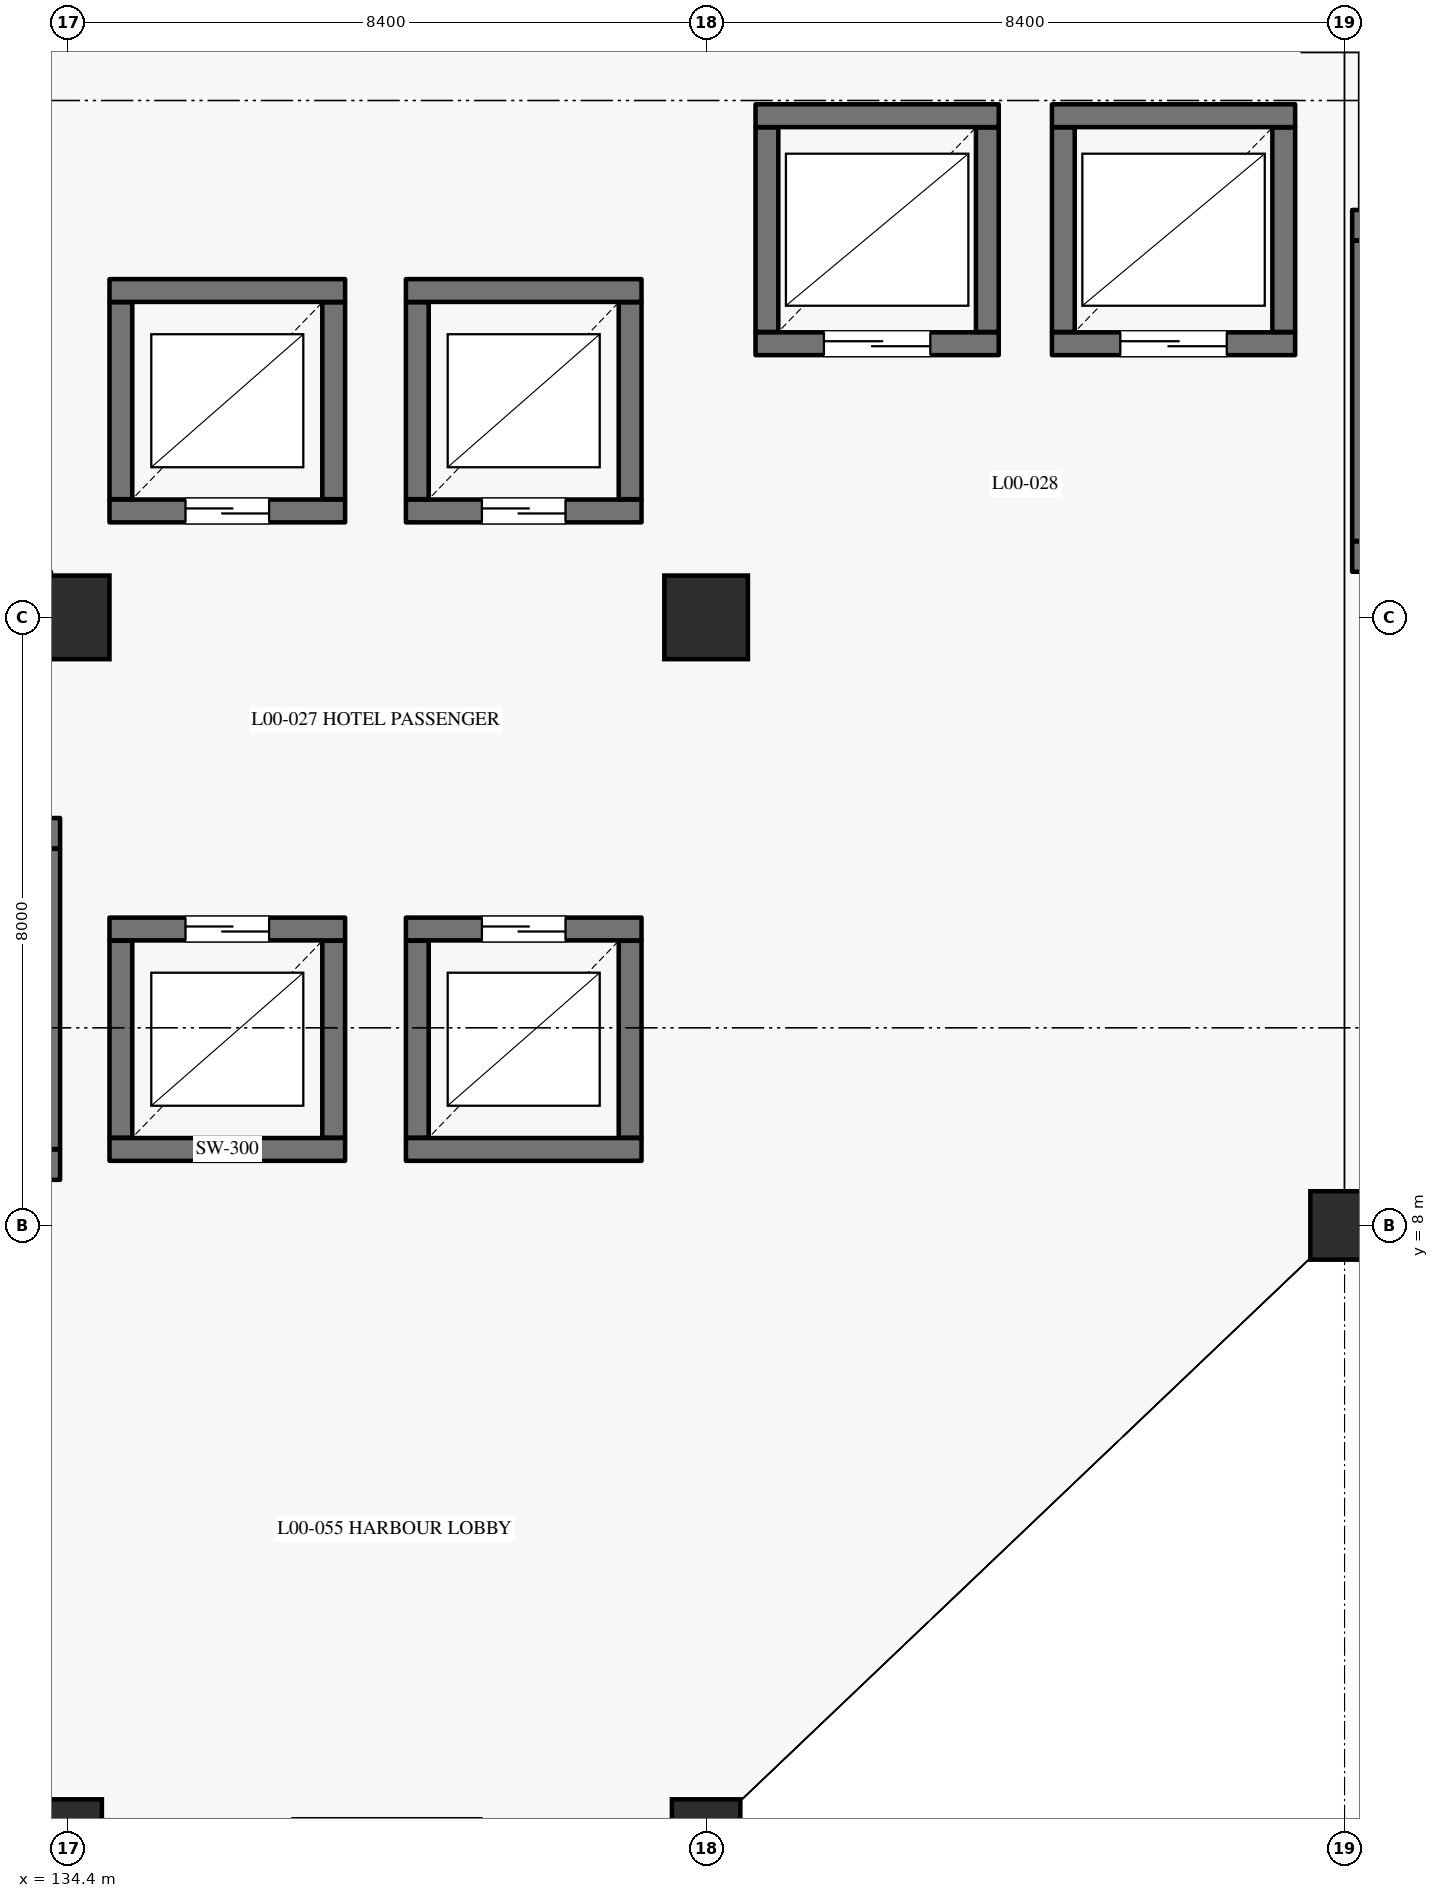
"""IFC4 building model, lengths in metres.
Left out: names, types, materials, properties, quantities, classifications, styles, units other than length and angle.
Written with IfcOpenShell. Run it as: python <this file> out.ifc"""

import sys

from ifc_helpers import new_model, si_unit, direction, frame, frame_2d, origin, origin_2d, place, context, subcontext, project, spatial, rectangle, circle, extrude, element, fill, save


model = new_model("IFC4")
c1 = context("Model", 3, precision=1e-05, world=origin(), true_north=direction((0.0, 1.0)))
c2 = subcontext(c1, "Body", "Model", "MODEL_VIEW")
j1 = project(units=[si_unit("LENGTHUNIT", "METRE"), si_unit("PLANEANGLEUNIT", "RADIAN")], contexts=[c1])
p1 = place(None, origin())
s1 = spatial("IfcSite", under=j1, at=p1, CompositionType="ELEMENT")
p2 = place(p1, origin())
s2 = spatial("IfcBuilding", under=s1, at=p2, CompositionType="ELEMENT")
p3 = place(p2, origin())
s3 = spatial("IfcBuildingStorey", under=s2, at=p3, CompositionType="ELEMENT", Elevation=0.0)
p4 = place(p3, frame((134.4, 0.0, 0.0), z_axis=(0.0, 0.0, 1.0), x_axis=(1.0, 0.0, 0.0)))
e1 = element("IfcColumn", 1, at=p4, inside=s3, PredefinedType="COLUMN", context=c2, shape_type="SweptSolid", body=[
    extrude(circle(Radius=0.45, at=origin_2d()), origin(), (0.0, 0.0, 1.0), 6.0),
])
p5 = place(p3, frame((134.4, 16.0, 0.0), z_axis=(0.0, 0.0, 1.0), x_axis=(1.0, 0.0, 0.0)))
e2 = element("IfcColumn", 2, at=p5, inside=s3, PredefinedType="COLUMN", context=c2, shape_type="SweptSolid", body=[
    extrude(circle(Radius=0.55, at=origin_2d()), origin(), (0.0, 0.0, 1.0), 6.0),
])
p6 = place(p3, frame((142.8, 0.0, 0.0), z_axis=(0.0, 0.0, 1.0), x_axis=(1.0, 0.0, 0.0)))
e3 = element("IfcColumn", 3, at=p6, inside=s3, PredefinedType="COLUMN", context=c2, shape_type="SweptSolid", body=[
    extrude(circle(Radius=0.45, at=origin_2d()), origin(), (0.0, 0.0, 1.0), 6.0),
])
p7 = place(p3, frame((142.8, 16.0, 0.0), z_axis=(0.0, 0.0, 1.0), x_axis=(1.0, 0.0, 0.0)))
e4 = element("IfcColumn", 4, at=p7, inside=s3, PredefinedType="COLUMN", context=c2, shape_type="SweptSolid", body=[
    extrude(circle(Radius=0.55, at=origin_2d()), origin(), (0.0, 0.0, 1.0), 6.0),
])
p8 = place(p3, frame((151.2, 8.0, 0.0), z_axis=(0.0, 0.0, 1.0), x_axis=(1.0, 0.0, 0.0)))
e5 = element("IfcColumn", 5, at=p8, inside=s3, PredefinedType="COLUMN", context=c2, shape_type="SweptSolid", body=[
    extrude(circle(Radius=0.45, at=origin_2d()), origin(), (0.0, 0.0, 1.0), 6.0),
])
p9 = place(p3, frame((134.95, 17.4, 0.0), z_axis=(0.0, 0.0, 1.0), x_axis=(1.0, 0.0, 0.0)))
e6 = element("IfcWall", 6, at=p9, inside=s3, PredefinedType="SHEAR", context=c2, shape_type="SweptSolid", body=[
    extrude(rectangle(XDim=3.1, YDim=0.3, at=frame_2d((1.55, 0.0))), origin(), (0.0, 0.0, 1.0), 5.675),
])
p10 = place(p9, frame((1.0, 0.0, 0.0)))
e7 = element("IfcOpeningElement", 7, at=p10, cuts=e6, PredefinedType="OPENING", context=c2, shape_type="SweptSolid", body=[
    extrude(rectangle(XDim=1.1, YDim=2.2, at=frame_2d((0.55, 1.1))), frame((0.0, 0.16, 0.0), z_axis=(0.0, -1.0, 0.0), x_axis=(1.0, 0.0, 0.0)), (0.0, 0.0, 1.0), 0.32),
])
p11 = place(p3, frame((137.9, 17.555, 0.0), z_axis=(0.0, 0.0, 1.0), x_axis=(0.0, 1.0, 0.0)))
e8 = element("IfcWall", 8, at=p11, inside=s3, PredefinedType="SHEAR", context=c2, shape_type="SweptSolid", body=[
    extrude(rectangle(XDim=2.59, YDim=0.3, at=frame_2d((1.295, 0.0))), origin(), (0.0, 0.0, 1.0), 5.675),
])
p12 = place(p3, frame((138.05, 20.3, 0.0), z_axis=(0.0, 0.0, 1.0), x_axis=(-1.0, 0.0, 0.0)))
e9 = element("IfcWall", 9, at=p12, inside=s3, PredefinedType="SHEAR", context=c2, shape_type="SweptSolid", body=[
    extrude(rectangle(XDim=3.1, YDim=0.3, at=frame_2d((1.55, 0.0))), origin(), (0.0, 0.0, 1.0), 5.675),
])
p13 = place(p3, frame((135.1, 20.145, 0.0), z_axis=(0.0, 0.0, 1.0), x_axis=(0.0, -1.0, 0.0)))
e10 = element("IfcWall", 10, at=p13, inside=s3, PredefinedType="SHEAR", context=c2, shape_type="SweptSolid", body=[
    extrude(rectangle(XDim=2.59, YDim=0.3, at=frame_2d((1.295, 0.0))), origin(), (0.0, 0.0, 1.0), 5.675),
])
p14 = place(p3, frame((138.85, 17.4, 0.0), z_axis=(0.0, 0.0, 1.0), x_axis=(1.0, 0.0, 0.0)))
e11 = element("IfcWall", 11, at=p14, inside=s3, PredefinedType="SHEAR", context=c2, shape_type="SweptSolid", body=[
    extrude(rectangle(XDim=3.1, YDim=0.3, at=frame_2d((1.55, 0.0))), origin(), (0.0, 0.0, 1.0), 5.675),
])
p15 = place(p14, frame((1.0, 0.0, 0.0)))
e12 = element("IfcOpeningElement", 12, at=p15, cuts=e11, PredefinedType="OPENING", context=c2, shape_type="SweptSolid", body=[
    extrude(rectangle(XDim=1.1, YDim=2.2, at=frame_2d((0.55, 1.1))), frame((0.0, 0.16, 0.0), z_axis=(0.0, -1.0, 0.0), x_axis=(1.0, 0.0, 0.0)), (0.0, 0.0, 1.0), 0.32),
])
p16 = place(p3, frame((141.8, 17.555, 0.0), z_axis=(0.0, 0.0, 1.0), x_axis=(0.0, 1.0, 0.0)))
e13 = element("IfcWall", 13, at=p16, inside=s3, PredefinedType="SHEAR", context=c2, shape_type="SweptSolid", body=[
    extrude(rectangle(XDim=2.59, YDim=0.3, at=frame_2d((1.295, 0.0))), origin(), (0.0, 0.0, 1.0), 5.675),
])
p17 = place(p3, frame((141.95, 20.3, 0.0), z_axis=(0.0, 0.0, 1.0), x_axis=(-1.0, 0.0, 0.0)))
e14 = element("IfcWall", 14, at=p17, inside=s3, PredefinedType="SHEAR", context=c2, shape_type="SweptSolid", body=[
    extrude(rectangle(XDim=3.1, YDim=0.3, at=frame_2d((1.55, 0.0))), origin(), (0.0, 0.0, 1.0), 5.675),
])
p18 = place(p3, frame((139.0, 20.145, 0.0), z_axis=(0.0, 0.0, 1.0), x_axis=(0.0, -1.0, 0.0)))
e15 = element("IfcWall", 15, at=p18, inside=s3, PredefinedType="SHEAR", context=c2, shape_type="SweptSolid", body=[
    extrude(rectangle(XDim=2.59, YDim=0.3, at=frame_2d((1.295, 0.0))), origin(), (0.0, 0.0, 1.0), 5.675),
])
p19 = place(p3, frame((134.95, 9.0, 0.0), z_axis=(0.0, 0.0, 1.0), x_axis=(1.0, 0.0, 0.0)))
e16 = element("IfcWall", 16, at=p19, inside=s3, PredefinedType="SHEAR", context=c2, shape_type="SweptSolid", body=[
    extrude(rectangle(XDim=3.1, YDim=0.3, at=frame_2d((1.55, 0.0))), origin(), (0.0, 0.0, 1.0), 5.675),
])
p20 = place(p3, frame((137.9, 9.155, 0.0), z_axis=(0.0, 0.0, 1.0), x_axis=(0.0, 1.0, 0.0)))
e17 = element("IfcWall", 17, at=p20, inside=s3, PredefinedType="SHEAR", context=c2, shape_type="SweptSolid", body=[
    extrude(rectangle(XDim=2.59, YDim=0.3, at=frame_2d((1.295, 0.0))), origin(), (0.0, 0.0, 1.0), 5.675),
])
p21 = place(p3, frame((138.05, 11.9, 0.0), z_axis=(0.0, 0.0, 1.0), x_axis=(-1.0, 0.0, 0.0)))
e18 = element("IfcWall", 18, at=p21, inside=s3, PredefinedType="SHEAR", context=c2, shape_type="SweptSolid", body=[
    extrude(rectangle(XDim=3.1, YDim=0.3, at=frame_2d((1.55, 0.0))), origin(), (0.0, 0.0, 1.0), 5.675),
])
p22 = place(p21, frame((1.0, 0.0, 0.0)))
e19 = element("IfcOpeningElement", 19, at=p22, cuts=e18, PredefinedType="OPENING", context=c2, shape_type="SweptSolid", body=[
    extrude(rectangle(XDim=1.1, YDim=2.2, at=frame_2d((0.55, 1.1))), frame((0.0, 0.16, 0.0), z_axis=(0.0, -1.0, 0.0), x_axis=(1.0, 0.0, 0.0)), (0.0, 0.0, 1.0), 0.32),
])
p23 = place(p3, frame((135.1, 11.745, 0.0), z_axis=(0.0, 0.0, 1.0), x_axis=(0.0, -1.0, 0.0)))
e20 = element("IfcWall", 20, at=p23, inside=s3, PredefinedType="SHEAR", context=c2, shape_type="SweptSolid", body=[
    extrude(rectangle(XDim=2.59, YDim=0.3, at=frame_2d((1.295, 0.0))), origin(), (0.0, 0.0, 1.0), 5.675),
])
p24 = place(p3, frame((138.85, 9.0, 0.0), z_axis=(0.0, 0.0, 1.0), x_axis=(1.0, 0.0, 0.0)))
e21 = element("IfcWall", 21, at=p24, inside=s3, PredefinedType="SHEAR", context=c2, shape_type="SweptSolid", body=[
    extrude(rectangle(XDim=3.1, YDim=0.3, at=frame_2d((1.55, 0.0))), origin(), (0.0, 0.0, 1.0), 5.675),
])
p25 = place(p3, frame((141.8, 9.155, 0.0), z_axis=(0.0, 0.0, 1.0), x_axis=(0.0, 1.0, 0.0)))
e22 = element("IfcWall", 22, at=p25, inside=s3, PredefinedType="SHEAR", context=c2, shape_type="SweptSolid", body=[
    extrude(rectangle(XDim=2.59, YDim=0.3, at=frame_2d((1.295, 0.0))), origin(), (0.0, 0.0, 1.0), 5.675),
])
p26 = place(p3, frame((141.95, 11.9, 0.0), z_axis=(0.0, 0.0, 1.0), x_axis=(-1.0, 0.0, 0.0)))
e23 = element("IfcWall", 23, at=p26, inside=s3, PredefinedType="SHEAR", context=c2, shape_type="SweptSolid", body=[
    extrude(rectangle(XDim=3.1, YDim=0.3, at=frame_2d((1.55, 0.0))), origin(), (0.0, 0.0, 1.0), 5.675),
])
p27 = place(p26, frame((1.0, 0.0, 0.0)))
e24 = element("IfcOpeningElement", 24, at=p27, cuts=e23, PredefinedType="OPENING", context=c2, shape_type="SweptSolid", body=[
    extrude(rectangle(XDim=1.1, YDim=2.2, at=frame_2d((0.55, 1.1))), frame((0.0, 0.16, 0.0), z_axis=(0.0, -1.0, 0.0), x_axis=(1.0, 0.0, 0.0)), (0.0, 0.0, 1.0), 0.32),
])
p28 = place(p3, frame((139.0, 11.745, 0.0), z_axis=(0.0, 0.0, 1.0), x_axis=(0.0, -1.0, 0.0)))
e25 = element("IfcWall", 25, at=p28, inside=s3, PredefinedType="SHEAR", context=c2, shape_type="SweptSolid", body=[
    extrude(rectangle(XDim=2.59, YDim=0.3, at=frame_2d((1.295, 0.0))), origin(), (0.0, 0.0, 1.0), 5.675),
])
p29 = place(p3, frame((143.45, 19.6, 0.0), z_axis=(0.0, 0.0, 1.0), x_axis=(1.0, 0.0, 0.0)))
e26 = element("IfcWall", 26, at=p29, inside=s3, PredefinedType="SHEAR", context=c2, shape_type="SweptSolid", body=[
    extrude(rectangle(XDim=3.2, YDim=0.3, at=frame_2d((1.6, 0.0))), origin(), (0.0, 0.0, 1.0), 5.675),
])
p30 = place(p29, frame((0.9, 0.0, 0.0)))
e27 = element("IfcOpeningElement", 27, at=p30, cuts=e26, PredefinedType="OPENING", context=c2, shape_type="SweptSolid", body=[
    extrude(rectangle(XDim=1.4, YDim=2.35, at=frame_2d((0.7, 1.175))), frame((0.0, 0.16, 0.0), z_axis=(0.0, -1.0, 0.0), x_axis=(1.0, 0.0, 0.0)), (0.0, 0.0, 1.0), 0.32),
])
p31 = place(p3, frame((146.5, 19.755, 0.0), z_axis=(0.0, 0.0, 1.0), x_axis=(0.0, 1.0, 0.0)))
e28 = element("IfcWall", 28, at=p31, inside=s3, PredefinedType="SHEAR", context=c2, shape_type="SweptSolid", body=[
    extrude(rectangle(XDim=2.69, YDim=0.3, at=frame_2d((1.345, 0.0))), origin(), (0.0, 0.0, 1.0), 5.675),
])
p32 = place(p3, frame((146.65, 22.6, 0.0), z_axis=(0.0, 0.0, 1.0), x_axis=(-1.0, 0.0, 0.0)))
e29 = element("IfcWall", 29, at=p32, inside=s3, PredefinedType="SHEAR", context=c2, shape_type="SweptSolid", body=[
    extrude(rectangle(XDim=3.2, YDim=0.3, at=frame_2d((1.6, 0.0))), origin(), (0.0, 0.0, 1.0), 5.675),
])
p33 = place(p3, frame((143.6, 22.445, 0.0), z_axis=(0.0, 0.0, 1.0), x_axis=(0.0, -1.0, 0.0)))
e30 = element("IfcWall", 30, at=p33, inside=s3, PredefinedType="SHEAR", context=c2, shape_type="SweptSolid", body=[
    extrude(rectangle(XDim=2.69, YDim=0.3, at=frame_2d((1.345, 0.0))), origin(), (0.0, 0.0, 1.0), 5.675),
])
p34 = place(p3, frame((147.35, 19.6, 0.0), z_axis=(0.0, 0.0, 1.0), x_axis=(1.0, 0.0, 0.0)))
e31 = element("IfcWall", 31, at=p34, inside=s3, PredefinedType="SHEAR", context=c2, shape_type="SweptSolid", body=[
    extrude(rectangle(XDim=3.2, YDim=0.3, at=frame_2d((1.6, 0.0))), origin(), (0.0, 0.0, 1.0), 5.675),
])
p35 = place(p34, frame((0.9, 0.0, 0.0)))
e32 = element("IfcOpeningElement", 32, at=p35, cuts=e31, PredefinedType="OPENING", context=c2, shape_type="SweptSolid", body=[
    extrude(rectangle(XDim=1.4, YDim=2.35, at=frame_2d((0.7, 1.175))), frame((0.0, 0.16, 0.0), z_axis=(0.0, -1.0, 0.0), x_axis=(1.0, 0.0, 0.0)), (0.0, 0.0, 1.0), 0.32),
])
p36 = place(p3, frame((150.4, 19.755, 0.0), z_axis=(0.0, 0.0, 1.0), x_axis=(0.0, 1.0, 0.0)))
e33 = element("IfcWall", 33, at=p36, inside=s3, PredefinedType="SHEAR", context=c2, shape_type="SweptSolid", body=[
    extrude(rectangle(XDim=2.69, YDim=0.3, at=frame_2d((1.345, 0.0))), origin(), (0.0, 0.0, 1.0), 5.675),
])
p37 = place(p3, frame((150.55, 22.6, 0.0), z_axis=(0.0, 0.0, 1.0), x_axis=(-1.0, 0.0, 0.0)))
e34 = element("IfcWall", 34, at=p37, inside=s3, PredefinedType="SHEAR", context=c2, shape_type="SweptSolid", body=[
    extrude(rectangle(XDim=3.2, YDim=0.3, at=frame_2d((1.6, 0.0))), origin(), (0.0, 0.0, 1.0), 5.675),
])
p38 = place(p3, frame((147.5, 22.445, 0.0), z_axis=(0.0, 0.0, 1.0), x_axis=(0.0, -1.0, 0.0)))
e35 = element("IfcWall", 35, at=p38, inside=s3, PredefinedType="SHEAR", context=c2, shape_type="SweptSolid", body=[
    extrude(rectangle(XDim=2.69, YDim=0.3, at=frame_2d((1.345, 0.0))), origin(), (0.0, 0.0, 1.0), 5.675),
])
p39 = place(p3, frame((126.1, 8.8, 0.0), z_axis=(0.0, 0.0, 1.0), x_axis=(1.0, 0.0, 0.0)))
e36 = element("IfcWall", 36, at=p39, inside=s3, PredefinedType="SHEAR", context=c2, shape_type="SweptSolid", body=[
    extrude(rectangle(XDim=8.2, YDim=0.4, at=frame_2d((4.1, 0.0))), origin(), (0.0, 0.0, 1.0), 5.675),
])
p40 = place(p3, frame((134.1, 9.005, 0.0), z_axis=(0.0, 0.0, 1.0), x_axis=(0.0, 1.0, 0.0)))
e37 = element("IfcWall", 37, at=p40, inside=s3, PredefinedType="SHEAR", context=c2, shape_type="SweptSolid", body=[
    extrude(rectangle(XDim=3.95, YDim=0.4, at=frame_2d((1.975, 0.0))), origin(), (0.0, 0.0, 1.0), 5.675),
])
p41 = place(p3, frame((126.1, 13.16, 0.0), z_axis=(0.0, 0.0, 1.0), x_axis=(1.0, 0.0, 0.0)))
e38 = element("IfcWall", 38, at=p41, inside=s3, PredefinedType="SHEAR", context=c2, shape_type="SweptSolid", body=[
    extrude(rectangle(XDim=8.2, YDim=0.4, at=frame_2d((4.1, 0.0))), origin(), (0.0, 0.0, 1.0), 5.675),
])
p42 = place(p41, frame((0.43, 0.0, 0.0)))
e39 = element("IfcOpeningElement", 39, at=p42, cuts=e38, PredefinedType="OPENING", context=c2, shape_type="SweptSolid", body=[
    extrude(rectangle(XDim=1.16, YDim=2.2, at=frame_2d((0.58, 1.1))), frame((0.0, 0.21, 0.0), z_axis=(0.0, -1.0, 0.0), x_axis=(1.0, 0.0, 0.0)), (0.0, 0.0, 1.0), 0.42),
])
p43 = place(p3, frame((151.3, 16.8, 0.0), z_axis=(0.0, 0.0, 1.0), x_axis=(1.0, 0.0, 0.0)))
e40 = element("IfcWall", 40, at=p43, inside=s3, PredefinedType="SHEAR", context=c2, shape_type="SweptSolid", body=[
    extrude(rectangle(XDim=8.2, YDim=0.4, at=frame_2d((4.1, 0.0))), origin(), (0.0, 0.0, 1.0), 5.675),
])
p44 = place(p3, frame((151.3, 21.16, 0.0), z_axis=(0.0, 0.0, 1.0), x_axis=(1.0, 0.0, 0.0)))
e41 = element("IfcWall", 41, at=p44, inside=s3, PredefinedType="SHEAR", context=c2, shape_type="SweptSolid", body=[
    extrude(rectangle(XDim=8.2, YDim=0.4, at=frame_2d((4.1, 0.0))), origin(), (0.0, 0.0, 1.0), 5.675),
])
p45 = place(p44, frame((0.43, 0.0, 0.0)))
e42 = element("IfcOpeningElement", 42, at=p45, cuts=e41, PredefinedType="OPENING", context=c2, shape_type="SweptSolid", body=[
    extrude(rectangle(XDim=1.16, YDim=2.2, at=frame_2d((0.58, 1.1))), frame((0.0, 0.21, 0.0), z_axis=(0.0, -1.0, 0.0), x_axis=(1.0, 0.0, 0.0)), (0.0, 0.0, 1.0), 0.42),
])
p46 = place(p3, frame((151.5, 17.005, 0.0), z_axis=(0.0, 0.0, 1.0), x_axis=(0.0, 1.0, 0.0)))
e43 = element("IfcWall", 43, at=p46, inside=s3, PredefinedType="SHEAR", context=c2, shape_type="SweptSolid", body=[
    extrude(rectangle(XDim=3.95, YDim=0.4, at=frame_2d((1.975, 0.0))), origin(), (0.0, 0.0, 1.0), 5.675),
])
p47 = place(p3, frame((151.5, 21.365, 0.0), z_axis=(0.0, 0.0, 1.0), x_axis=(0.0, 1.0, 0.0)))
e44 = element("IfcWall", 44, at=p47, inside=s3, PredefinedType="PARTITIONING", context=c2, shape_type="SweptSolid", body=[
    extrude(rectangle(XDim=5.82, YDim=0.22, at=frame_2d((2.91, 0.0))), origin(), (0.0, 0.0, 1.0), 4.75),
])
p48 = place(p10, origin())
e45 = element("IfcDoor", 45, at=p48, inside=s3, OperationType="DOUBLE_DOOR_SLIDING", PredefinedType="DOOR", context=c2, shape_type="SweptSolid", body=[
    extrude(rectangle(XDim=1.1, YDim=2.2, at=frame_2d((0.55, 1.1))), frame((0.0, 0.025, 0.0), z_axis=(0.0, -1.0, 0.0), x_axis=(1.0, 0.0, 0.0)), (0.0, 0.0, 1.0), 0.05),
])
fill(e7, e45)
p49 = place(p15, origin())
e46 = element("IfcDoor", 46, at=p49, inside=s3, OperationType="DOUBLE_DOOR_SLIDING", PredefinedType="DOOR", context=c2, shape_type="SweptSolid", body=[
    extrude(rectangle(XDim=1.1, YDim=2.2, at=frame_2d((0.55, 1.1))), frame((0.0, 0.025, 0.0), z_axis=(0.0, -1.0, 0.0), x_axis=(1.0, 0.0, 0.0)), (0.0, 0.0, 1.0), 0.05),
])
fill(e12, e46)
p50 = place(p22, origin())
e47 = element("IfcDoor", 47, at=p50, inside=s3, OperationType="DOUBLE_DOOR_SLIDING", PredefinedType="DOOR", context=c2, shape_type="SweptSolid", body=[
    extrude(rectangle(XDim=1.1, YDim=2.2, at=frame_2d((0.55, 1.1))), frame((0.0, 0.025, 0.0), z_axis=(0.0, -1.0, 0.0), x_axis=(1.0, 0.0, 0.0)), (0.0, 0.0, 1.0), 0.05),
])
fill(e19, e47)
p51 = place(p27, origin())
e48 = element("IfcDoor", 48, at=p51, inside=s3, OperationType="DOUBLE_DOOR_SLIDING", PredefinedType="DOOR", context=c2, shape_type="SweptSolid", body=[
    extrude(rectangle(XDim=1.1, YDim=2.2, at=frame_2d((0.55, 1.1))), frame((0.0, 0.025, 0.0), z_axis=(0.0, -1.0, 0.0), x_axis=(1.0, 0.0, 0.0)), (0.0, 0.0, 1.0), 0.05),
])
fill(e24, e48)
p52 = place(p30, origin())
e49 = element("IfcDoor", 49, at=p52, inside=s3, OperationType="DOUBLE_DOOR_SLIDING", PredefinedType="DOOR", context=c2, shape_type="SweptSolid", body=[
    extrude(rectangle(XDim=1.4, YDim=2.35, at=frame_2d((0.7, 1.175))), frame((0.0, 0.025, 0.0), z_axis=(0.0, -1.0, 0.0), x_axis=(1.0, 0.0, 0.0)), (0.0, 0.0, 1.0), 0.05),
])
fill(e27, e49)
p53 = place(p35, origin())
e50 = element("IfcDoor", 50, at=p53, inside=s3, OperationType="DOUBLE_DOOR_SLIDING", PredefinedType="DOOR", context=c2, shape_type="SweptSolid", body=[
    extrude(rectangle(XDim=1.4, YDim=2.35, at=frame_2d((0.7, 1.175))), frame((0.0, 0.025, 0.0), z_axis=(0.0, -1.0, 0.0), x_axis=(1.0, 0.0, 0.0)), (0.0, 0.0, 1.0), 0.05),
])
fill(e32, e50)
save(model, sys.argv[1])
